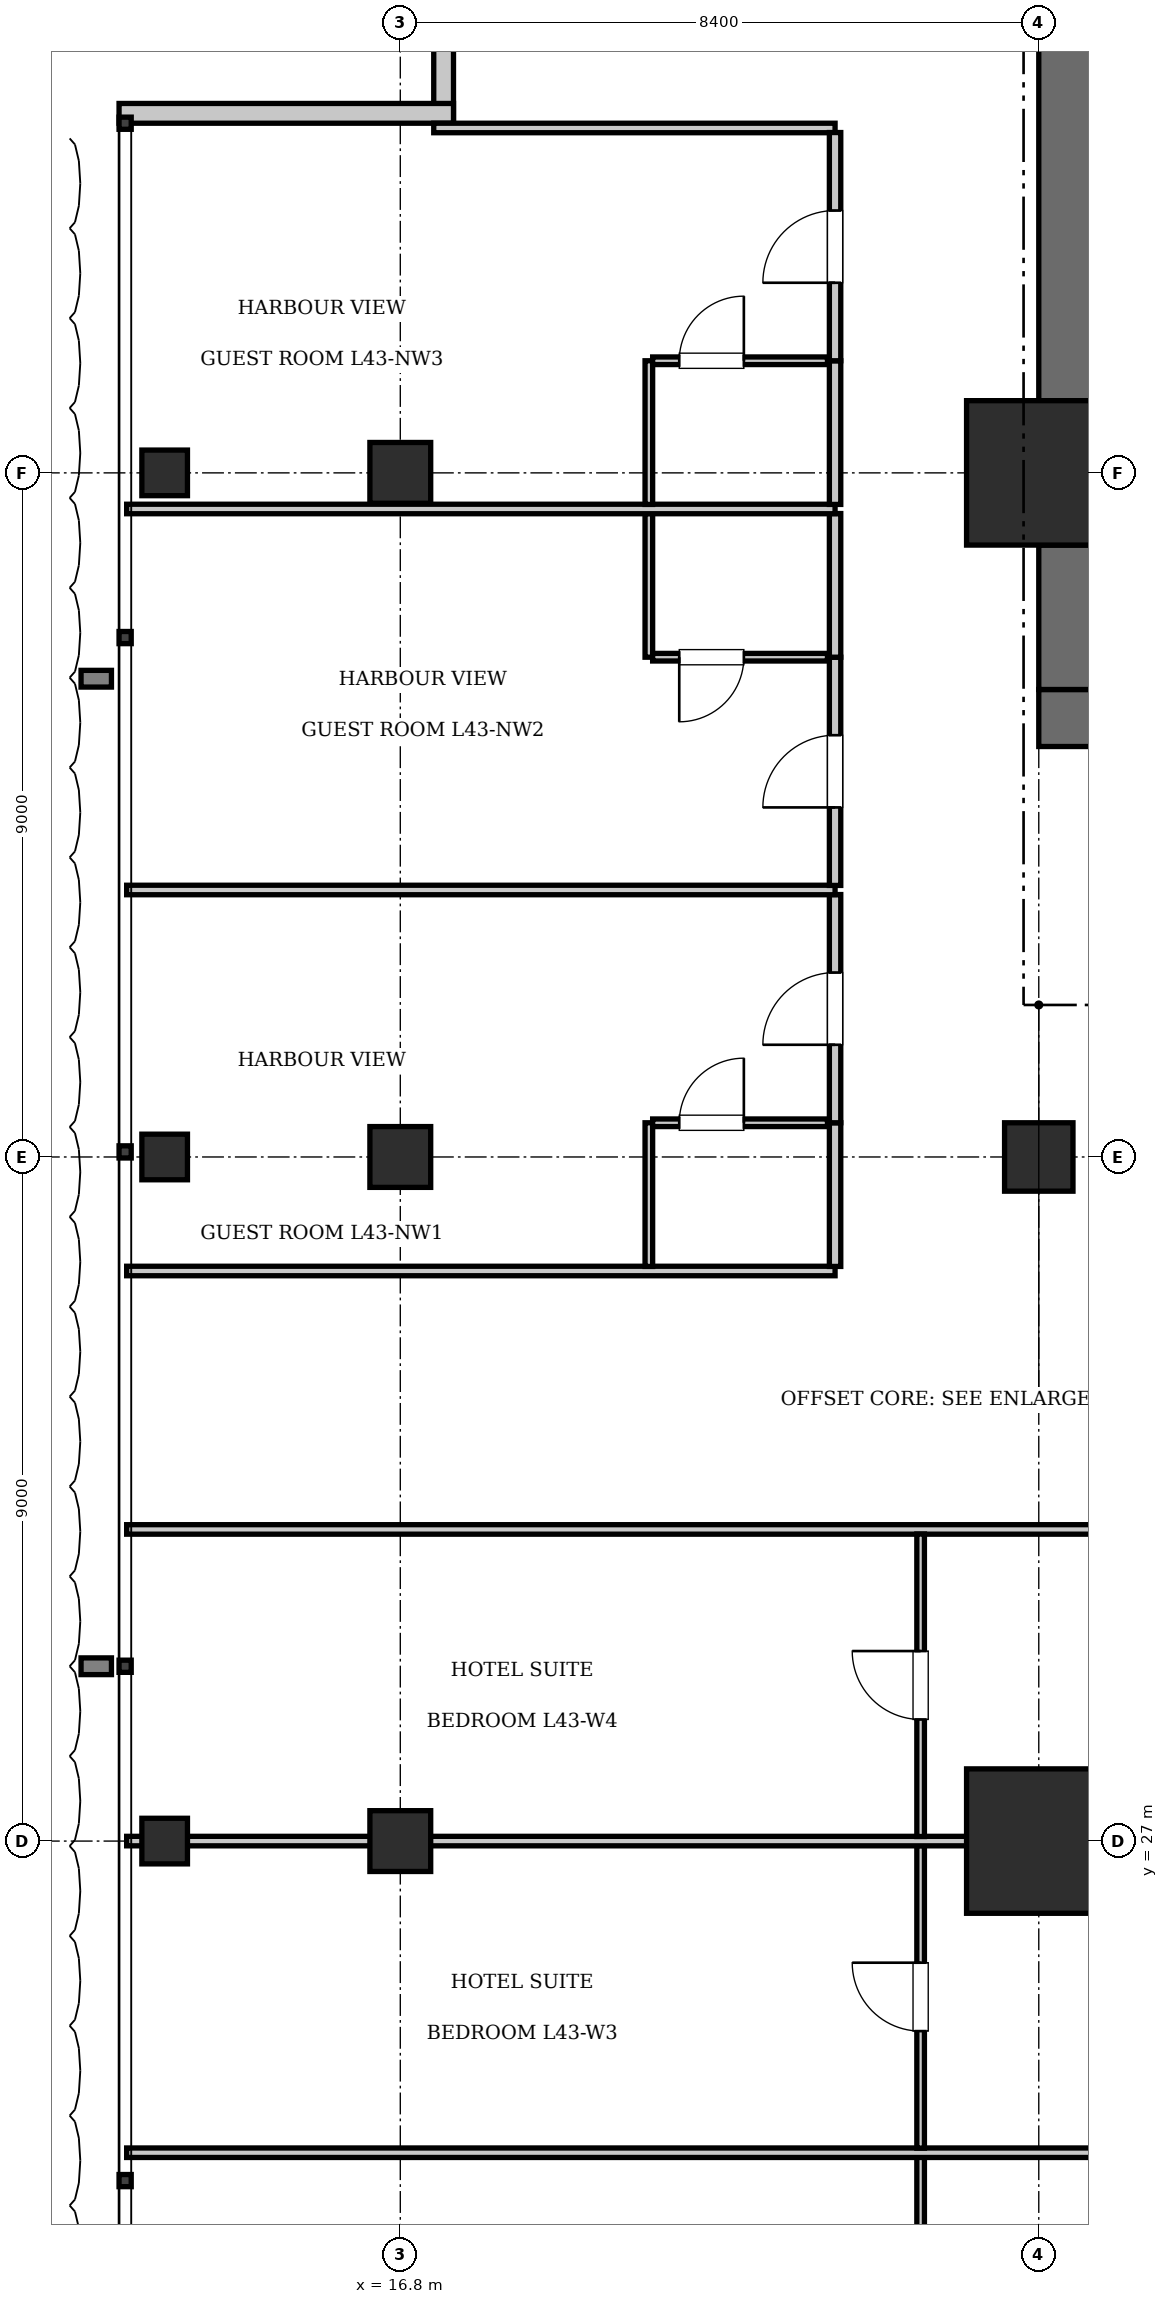
"""IFC4 building model, lengths in metres.
Left out: names, types, materials, properties, quantities, classifications, styles, units other than length and angle.
Written with IfcOpenShell. Run it as: python <this file> out.ifc"""

import sys

from ifc_helpers import new_model, si_unit, direction, frame, frame_2d, origin, origin_2d, place, context, subcontext, project, spatial, rectangle, i_section, extrude, element, fill, save


model = new_model("IFC4")
c1 = context("Model", 3, precision=1e-05, world=origin(), true_north=direction((0.0, 1.0)))
c2 = subcontext(c1, "Body", "Model", "MODEL_VIEW")
j1 = project(units=[si_unit("LENGTHUNIT", "METRE"), si_unit("PLANEANGLEUNIT", "RADIAN")], contexts=[c1])
p1 = place(None, origin())
s1 = spatial("IfcSite", under=j1, at=p1, CompositionType="ELEMENT")
p2 = place(p1, origin())
s2 = spatial("IfcBuilding", under=s1, at=p2, CompositionType="ELEMENT")
p3 = place(p2, frame((0.0, 0.0, 177.45)))
s3 = spatial("IfcBuildingStorey", under=s2, at=p3, CompositionType="ELEMENT", Elevation=177.45)
for number, where, z_axis, x_axis in (
    (1, (25.2, 27.0, 0.0), (0.0, 0.0, 1.0), (1.0, 0.0, 0.0)),
    (2, (25.2, 45.0, 0.0), (0.0, 0.0, 1.0), (1.0, 0.0, 0.0)),
):
    element("IfcColumn", number, at=place(p3, frame(where, z_axis=z_axis, x_axis=x_axis)), inside=s3, PredefinedType="COLUMN", context=c2, shape_type="SweptSolid", body=[
        extrude(rectangle(XDim=1.9, YDim=1.9, at=origin_2d()), origin(), (0.0, 0.0, 1.0), 3.85),
    ])
p4 = place(p3, frame((25.2, 41.775, 0.0), z_axis=(0.0, 0.0, 1.0), x_axis=(1.0, 0.0, 0.0)))
e3 = element("IfcWall", 3, at=p4, inside=s3, PredefinedType="SHEAR", context=c2, shape_type="SweptSolid", body=[
    extrude(rectangle(XDim=6.8, YDim=0.75, at=frame_2d((3.4, 0.0))), origin(), (0.0, 0.0, 1.0), 3.85),
])
p5 = place(p4, frame((1.65, 0.0, 0.0)))
e4 = element("IfcOpeningElement", 4, at=p5, cuts=e3, PredefinedType="OPENING", context=c2, shape_type="SweptSolid", body=[
    extrude(rectangle(XDim=1.15, YDim=2.15, at=frame_2d((0.575, 1.075))), frame((0.0, 0.385, 0.0), z_axis=(0.0, -1.0, 0.0), x_axis=(1.0, 0.0, 0.0)), (0.0, 0.0, 1.0), 0.77),
])
p6 = place(p4, frame((5.15, 0.0, 0.0)))
e5 = element("IfcOpeningElement", 5, at=p6, cuts=e3, PredefinedType="OPENING", context=c2, shape_type="SweptSolid", body=[
    extrude(rectangle(XDim=1.1, YDim=2.2, at=frame_2d((0.55, 1.1))), frame((0.0, 0.385, 0.0), z_axis=(0.0, -1.0, 0.0), x_axis=(1.0, 0.0, 0.0)), (0.0, 0.0, 1.0), 0.77),
])
p7 = place(p3, frame((25.575, 42.15, 0.0), z_axis=(0.0, 0.0, 1.0), x_axis=(0.0, 1.0, 0.0)))
e6 = element("IfcWall", 6, at=p7, inside=s3, PredefinedType="SHEAR", context=c2, shape_type="SweptSolid", body=[
    extrude(rectangle(XDim=1.9, YDim=0.75, at=frame_2d((0.95, 0.0))), origin(), (0.0, 0.0, 1.0), 3.85),
])
p8 = place(p3, frame((25.575, 45.95, 0.0), z_axis=(0.0, 0.0, 1.0), x_axis=(0.0, 1.0, 0.0)))
e7 = element("IfcWall", 7, at=p8, inside=s3, PredefinedType="SHEAR", context=c2, shape_type="SweptSolid", body=[
    extrude(rectangle(XDim=7.3, YDim=0.75, at=frame_2d((3.65, 0.0))), origin(), (0.0, 0.0, 1.0), 3.85),
])
p9 = place(p3, frame((25.2, 36.0, 0.0), z_axis=(0.0, 0.0, 1.0), x_axis=(1.0, 0.0, 0.0)))
e8 = element("IfcColumn", 8, at=p9, inside=s3, PredefinedType="COLUMN", context=c2, shape_type="SweptSolid", body=[
    extrude(rectangle(XDim=0.9, YDim=0.9, at=origin_2d()), origin(), (0.0, 0.0, 1.0), 3.85),
])
for number, where, z_axis, x_axis in (
    (9, (16.8, 27.0, 0.0), (0.0, 0.0, 1.0), (1.0, 0.0, 0.0)),
    (10, (16.8, 36.0, 0.0), (0.0, 0.0, 1.0), (1.0, 0.0, 0.0)),
    (11, (16.8, 45.0, 0.0), (0.0, 0.0, 1.0), (1.0, 0.0, 0.0)),
):
    element("IfcColumn", number, at=place(p3, frame(where, z_axis=z_axis, x_axis=x_axis)), inside=s3, PredefinedType="COLUMN", context=c2, shape_type="SweptSolid", body=[
        extrude(rectangle(XDim=0.8, YDim=0.8, at=origin_2d()), origin(), (0.0, 0.0, 1.0), 3.85),
    ])
for number, where, z_axis, x_axis in (
    (12, (13.7, 27.0, 0.0), (0.0, 0.0, 1.0), (1.0, 0.0, 0.0)),
    (13, (13.7, 36.0, 0.0), (0.0, 0.0, 1.0), (1.0, 0.0, 0.0)),
    (14, (13.7, 45.0, 0.0), (0.0, 0.0, 1.0), (1.0, 0.0, 0.0)),
):
    element("IfcColumn", number, at=place(p3, frame(where, z_axis=z_axis, x_axis=x_axis)), inside=s3, PredefinedType="COLUMN", context=c2, shape_type="SweptSolid", body=[
        extrude(i_section(OverallWidth=0.6, OverallDepth=0.6, WebThickness=0.025, FlangeThickness=0.038, at=origin_2d()), origin(), (0.0, 0.0, 1.0), 3.85),
    ])
for number, where, z_axis, x_axis in (
    (15, (17.37, 49.6, 0.0), (0.0, 0.0, 1.0), (0.0, 1.0, 0.0)),
    (16, (13.1, 49.73, 0.0), (0.0, 0.0, 1.0), (1.0, 0.0, 0.0)),
):
    element("IfcWall", number, at=place(p3, frame(where, z_axis=z_axis, x_axis=x_axis)), inside=s3, PredefinedType="SOLIDWALL", context=c2, shape_type="SweptSolid", body=[
        extrude(rectangle(XDim=4.4, YDim=0.26, at=frame_2d((2.2, 0.0))), origin(), (0.0, 0.0, 1.0), 3.61),
    ])
p10 = place(p3, frame((13.2, 31.1, 0.0), z_axis=(0.0, 0.0, 1.0), x_axis=(1.0, 0.0, 0.0)))
e17 = element("IfcWall", 17, at=p10, inside=s3, PredefinedType="PARTITIONING", context=c2, shape_type="SweptSolid", body=[
    extrude(rectangle(XDim=24.32, YDim=0.125, at=frame_2d((12.16, 0.0))), origin(), (0.0, 0.0, 1.0), 3.61),
])
p11 = place(p3, frame((23.646, 18.86, 0.0), z_axis=(0.0, 0.0, 1.0), x_axis=(0.0, 1.0, 0.0)))
e18 = element("IfcWall", 18, at=p11, inside=s3, PredefinedType="PARTITIONING", context=c2, shape_type="SweptSolid", body=[
    extrude(rectangle(XDim=3.98, YDim=0.1, at=frame_2d((1.99, 0.0))), origin(), (0.0, 0.0, 1.0), 3.61),
])
p12 = place(p11, frame((1.54, 0.0, 0.0)))
e19 = element("IfcOpeningElement", 19, at=p12, cuts=e18, PredefinedType="OPENING", context=c2, shape_type="SweptSolid", body=[
    extrude(rectangle(XDim=0.9, YDim=2.1, at=frame_2d((0.45, 1.05))), frame((0.0, 0.06, 0.0), z_axis=(0.0, -1.0, 0.0), x_axis=(1.0, 0.0, 0.0)), (0.0, 0.0, 1.0), 0.12),
])
p13 = place(p3, frame((13.2, 22.9, 0.0), z_axis=(0.0, 0.0, 1.0), x_axis=(1.0, 0.0, 0.0)))
e20 = element("IfcWall", 20, at=p13, inside=s3, PredefinedType="PARTITIONING", context=c2, shape_type="SweptSolid", body=[
    extrude(rectangle(XDim=24.32, YDim=0.125, at=frame_2d((12.16, 0.0))), origin(), (0.0, 0.0, 1.0), 3.61),
])
p14 = place(p3, frame((23.646, 22.96, 0.0), z_axis=(0.0, 0.0, 1.0), x_axis=(0.0, 1.0, 0.0)))
e21 = element("IfcWall", 21, at=p14, inside=s3, PredefinedType="PARTITIONING", context=c2, shape_type="SweptSolid", body=[
    extrude(rectangle(XDim=3.98, YDim=0.1, at=frame_2d((1.99, 0.0))), origin(), (0.0, 0.0, 1.0), 3.61),
])
p15 = place(p14, frame((1.54, 0.0, 0.0)))
e22 = element("IfcOpeningElement", 22, at=p15, cuts=e21, PredefinedType="OPENING", context=c2, shape_type="SweptSolid", body=[
    extrude(rectangle(XDim=0.9, YDim=2.1, at=frame_2d((0.45, 1.05))), frame((0.0, 0.06, 0.0), z_axis=(0.0, -1.0, 0.0), x_axis=(1.0, 0.0, 0.0)), (0.0, 0.0, 1.0), 0.12),
])
p16 = place(p3, frame((13.2, 27.0, 0.0), z_axis=(0.0, 0.0, 1.0), x_axis=(1.0, 0.0, 0.0)))
e23 = element("IfcWall", 23, at=p16, inside=s3, PredefinedType="PARTITIONING", context=c2, shape_type="SweptSolid", body=[
    extrude(rectangle(XDim=24.32, YDim=0.125, at=frame_2d((12.16, 0.0))), origin(), (0.0, 0.0, 1.0), 2.41),
])
p17 = place(p3, frame((23.646, 27.06, 0.0), z_axis=(0.0, 0.0, 1.0), x_axis=(0.0, 1.0, 0.0)))
e24 = element("IfcWall", 24, at=p17, inside=s3, PredefinedType="PARTITIONING", context=c2, shape_type="SweptSolid", body=[
    extrude(rectangle(XDim=3.98, YDim=0.1, at=frame_2d((1.99, 0.0))), origin(), (0.0, 0.0, 1.0), 3.61),
])
p18 = place(p17, frame((1.54, 0.0, 0.0)))
e25 = element("IfcOpeningElement", 25, at=p18, cuts=e24, PredefinedType="OPENING", context=c2, shape_type="SweptSolid", body=[
    extrude(rectangle(XDim=0.9, YDim=2.1, at=frame_2d((0.45, 1.05))), frame((0.0, 0.06, 0.0), z_axis=(0.0, -1.0, 0.0), x_axis=(1.0, 0.0, 0.0)), (0.0, 0.0, 1.0), 0.12),
])
p19 = place(p3, frame((13.2, 34.5, 0.0), z_axis=(0.0, 0.0, 1.0), x_axis=(1.0, 0.0, 0.0)))
e26 = element("IfcWall", 26, at=p19, inside=s3, PredefinedType="PARTITIONING", context=c2, shape_type="SweptSolid", body=[
    extrude(rectangle(XDim=9.32, YDim=0.125, at=frame_2d((4.66, 0.0))), origin(), (0.0, 0.0, 1.0), 3.61),
])
p20 = place(p3, frame((17.24, 49.538, 0.0), z_axis=(0.0, 0.0, 1.0), x_axis=(1.0, 0.0, 0.0)))
e27 = element("IfcWall", 27, at=p20, inside=s3, PredefinedType="PARTITIONING", context=c2, shape_type="SweptSolid", body=[
    extrude(rectangle(XDim=5.28, YDim=0.125, at=frame_2d((2.64, 0.0))), origin(), (0.0, 0.0, 1.0), 3.61),
])
p21 = place(p3, frame((22.52, 34.56, 0.0), z_axis=(0.0, 0.0, 1.0), x_axis=(0.0, 1.0, 0.0)))
e28 = element("IfcWall", 28, at=p21, inside=s3, PredefinedType="PARTITIONING", context=c2, shape_type="SweptSolid", body=[
    extrude(rectangle(XDim=1.89, YDim=0.15, at=frame_2d((0.945, 0.0))), origin(), (0.0, 0.0, 1.0), 3.61),
])
p22 = place(p3, frame((22.52, 36.45, 0.0), z_axis=(0.0, 0.0, 1.0), x_axis=(0.0, 1.0, 0.0)))
e29 = element("IfcWall", 29, at=p22, inside=s3, PredefinedType="PARTITIONING", context=c2, shape_type="SweptSolid", body=[
    extrude(rectangle(XDim=3.002, YDim=0.15, at=frame_2d((1.501, 0.0))), origin(), (0.0, 0.0, 1.0), 3.61),
])
p23 = place(p22, frame((1.026, 0.0, 0.0)))
e30 = element("IfcOpeningElement", 30, at=p23, cuts=e29, PredefinedType="OPENING", context=c2, shape_type="SweptSolid", body=[
    extrude(rectangle(XDim=0.95, YDim=2.15, at=frame_2d((0.475, 1.075))), frame((0.0, 0.085, 0.0), z_axis=(0.0, -1.0, 0.0), x_axis=(1.0, 0.0, 0.0)), (0.0, 0.0, 1.0), 0.17),
])
p24 = place(p3, frame((20.07, 34.56, 0.0), z_axis=(0.0, 0.0, 1.0), x_axis=(0.0, 1.0, 0.0)))
e31 = element("IfcWall", 31, at=p24, inside=s3, PredefinedType="PARTITIONING", context=c2, shape_type="SweptSolid", body=[
    extrude(rectangle(XDim=1.89, YDim=0.1, at=frame_2d((0.945, 0.0))), origin(), (0.0, 0.0, 1.0), 3.61),
])
p25 = place(p3, frame((20.12, 36.45, 0.0), z_axis=(0.0, 0.0, 1.0), x_axis=(1.0, 0.0, 0.0)))
e32 = element("IfcWall", 32, at=p25, inside=s3, PredefinedType="PARTITIONING", context=c2, shape_type="SweptSolid", body=[
    extrude(rectangle(XDim=2.3, YDim=0.1, at=frame_2d((1.15, 0.0))), origin(), (0.0, 0.0, 1.0), 3.61),
])
p26 = place(p25, frame((0.35, 0.0, 0.0)))
e33 = element("IfcOpeningElement", 33, at=p26, cuts=e32, PredefinedType="OPENING", context=c2, shape_type="SweptSolid", body=[
    extrude(rectangle(XDim=0.85, YDim=2.1, at=frame_2d((0.425, 1.05))), frame((0.0, 0.06, 0.0), z_axis=(0.0, -1.0, 0.0), x_axis=(1.0, 0.0, 0.0)), (0.0, 0.0, 1.0), 0.12),
])
p27 = place(p3, frame((13.2, 39.512, 0.0), z_axis=(0.0, 0.0, 1.0), x_axis=(1.0, 0.0, 0.0)))
e34 = element("IfcWall", 34, at=p27, inside=s3, PredefinedType="PARTITIONING", context=c2, shape_type="SweptSolid", body=[
    extrude(rectangle(XDim=9.32, YDim=0.125, at=frame_2d((4.66, 0.0))), origin(), (0.0, 0.0, 1.0), 3.61),
])
p28 = place(p3, frame((22.52, 39.573, 0.0), z_axis=(0.0, 0.0, 1.0), x_axis=(0.0, 1.0, 0.0)))
e35 = element("IfcWall", 35, at=p28, inside=s3, PredefinedType="PARTITIONING", context=c2, shape_type="SweptSolid", body=[
    extrude(rectangle(XDim=3.002, YDim=0.15, at=frame_2d((1.501, 0.0))), origin(), (0.0, 0.0, 1.0), 3.61),
])
p29 = place(p28, frame((1.026, 0.0, 0.0)))
e36 = element("IfcOpeningElement", 36, at=p29, cuts=e35, PredefinedType="OPENING", context=c2, shape_type="SweptSolid", body=[
    extrude(rectangle(XDim=0.95, YDim=2.15, at=frame_2d((0.475, 1.075))), frame((0.0, 0.085, 0.0), z_axis=(0.0, -1.0, 0.0), x_axis=(1.0, 0.0, 0.0)), (0.0, 0.0, 1.0), 0.17),
])
p30 = place(p3, frame((22.52, 42.575, 0.0), z_axis=(0.0, 0.0, 1.0), x_axis=(0.0, 1.0, 0.0)))
e37 = element("IfcWall", 37, at=p30, inside=s3, PredefinedType="PARTITIONING", context=c2, shape_type="SweptSolid", body=[
    extrude(rectangle(XDim=1.89, YDim=0.15, at=frame_2d((0.945, 0.0))), origin(), (0.0, 0.0, 1.0), 3.61),
])
p31 = place(p3, frame((20.07, 42.575, 0.0), z_axis=(0.0, 0.0, 1.0), x_axis=(0.0, 1.0, 0.0)))
e38 = element("IfcWall", 38, at=p31, inside=s3, PredefinedType="PARTITIONING", context=c2, shape_type="SweptSolid", body=[
    extrude(rectangle(XDim=1.89, YDim=0.1, at=frame_2d((0.945, 0.0))), origin(), (0.0, 0.0, 1.0), 3.61),
])
p32 = place(p3, frame((20.12, 42.575, 0.0), z_axis=(0.0, 0.0, 1.0), x_axis=(1.0, 0.0, 0.0)))
e39 = element("IfcWall", 39, at=p32, inside=s3, PredefinedType="PARTITIONING", context=c2, shape_type="SweptSolid", body=[
    extrude(rectangle(XDim=2.3, YDim=0.1, at=frame_2d((1.15, 0.0))), origin(), (0.0, 0.0, 1.0), 3.61),
])
p33 = place(p32, frame((0.35, 0.0, 0.0)))
e40 = element("IfcOpeningElement", 40, at=p33, cuts=e39, PredefinedType="OPENING", context=c2, shape_type="SweptSolid", body=[
    extrude(rectangle(XDim=0.85, YDim=2.1, at=frame_2d((0.425, 1.05))), frame((0.0, 0.06, 0.0), z_axis=(0.0, -1.0, 0.0), x_axis=(1.0, 0.0, 0.0)), (0.0, 0.0, 1.0), 0.12),
])
p34 = place(p3, frame((13.2, 44.525, 0.0), z_axis=(0.0, 0.0, 1.0), x_axis=(1.0, 0.0, 0.0)))
e41 = element("IfcWall", 41, at=p34, inside=s3, PredefinedType="PARTITIONING", context=c2, shape_type="SweptSolid", body=[
    extrude(rectangle(XDim=9.32, YDim=0.125, at=frame_2d((4.66, 0.0))), origin(), (0.0, 0.0, 1.0), 3.61),
])
p35 = place(p3, frame((22.52, 44.585, 0.0), z_axis=(0.0, 0.0, 1.0), x_axis=(0.0, 1.0, 0.0)))
e42 = element("IfcWall", 42, at=p35, inside=s3, PredefinedType="PARTITIONING", context=c2, shape_type="SweptSolid", body=[
    extrude(rectangle(XDim=1.89, YDim=0.15, at=frame_2d((0.945, 0.0))), origin(), (0.0, 0.0, 1.0), 3.61),
])
p36 = place(p3, frame((22.52, 46.475, 0.0), z_axis=(0.0, 0.0, 1.0), x_axis=(0.0, 1.0, 0.0)))
e43 = element("IfcWall", 43, at=p36, inside=s3, PredefinedType="PARTITIONING", context=c2, shape_type="SweptSolid", body=[
    extrude(rectangle(XDim=3.002, YDim=0.15, at=frame_2d((1.501, 0.0))), origin(), (0.0, 0.0, 1.0), 3.61),
])
p37 = place(p36, frame((1.026, 0.0, 0.0)))
e44 = element("IfcOpeningElement", 44, at=p37, cuts=e43, PredefinedType="OPENING", context=c2, shape_type="SweptSolid", body=[
    extrude(rectangle(XDim=0.95, YDim=2.15, at=frame_2d((0.475, 1.075))), frame((0.0, 0.085, 0.0), z_axis=(0.0, -1.0, 0.0), x_axis=(1.0, 0.0, 0.0)), (0.0, 0.0, 1.0), 0.17),
])
p38 = place(p3, frame((20.07, 44.585, 0.0), z_axis=(0.0, 0.0, 1.0), x_axis=(0.0, 1.0, 0.0)))
e45 = element("IfcWall", 45, at=p38, inside=s3, PredefinedType="PARTITIONING", context=c2, shape_type="SweptSolid", body=[
    extrude(rectangle(XDim=1.89, YDim=0.1, at=frame_2d((0.945, 0.0))), origin(), (0.0, 0.0, 1.0), 3.61),
])
p39 = place(p3, frame((20.12, 46.475, 0.0), z_axis=(0.0, 0.0, 1.0), x_axis=(1.0, 0.0, 0.0)))
e46 = element("IfcWall", 46, at=p39, inside=s3, PredefinedType="PARTITIONING", context=c2, shape_type="SweptSolid", body=[
    extrude(rectangle(XDim=2.3, YDim=0.1, at=frame_2d((1.15, 0.0))), origin(), (0.0, 0.0, 1.0), 3.61),
])
p40 = place(p39, frame((0.35, 0.0, 0.0)))
e47 = element("IfcOpeningElement", 47, at=p40, cuts=e46, PredefinedType="OPENING", context=c2, shape_type="SweptSolid", body=[
    extrude(rectangle(XDim=0.85, YDim=2.1, at=frame_2d((0.425, 1.05))), frame((0.0, 0.06, 0.0), z_axis=(0.0, -1.0, 0.0), x_axis=(1.0, 0.0, 0.0)), (0.0, 0.0, 1.0), 0.12),
])
p41 = place(p15, origin())
e48 = element("IfcDoor", 48, at=p41, inside=s3, OperationType="SINGLE_SWING_RIGHT", PredefinedType="DOOR", context=c2, shape_type="SweptSolid", body=[
    extrude(rectangle(XDim=0.9, YDim=2.1, at=frame_2d((0.45, 1.05))), frame((0.0, 0.025, 0.0), z_axis=(0.0, -1.0, 0.0), x_axis=(1.0, 0.0, 0.0)), (0.0, 0.0, 1.0), 0.05),
])
fill(e22, e48)
p42 = place(p18, origin())
e49 = element("IfcDoor", 49, at=p42, inside=s3, OperationType="SINGLE_SWING_RIGHT", PredefinedType="DOOR", context=c2, shape_type="SweptSolid", body=[
    extrude(rectangle(XDim=0.9, YDim=2.1, at=frame_2d((0.45, 1.05))), frame((0.0, 0.025, 0.0), z_axis=(0.0, -1.0, 0.0), x_axis=(1.0, 0.0, 0.0)), (0.0, 0.0, 1.0), 0.05),
])
fill(e25, e49)
p43 = place(p26, origin())
e50 = element("IfcDoor", 50, at=p43, inside=s3, OperationType="SINGLE_SWING_RIGHT", PredefinedType="DOOR", context=c2, shape_type="SweptSolid", body=[
    extrude(rectangle(XDim=0.85, YDim=2.1, at=frame_2d((0.425, 1.05))), frame((0.0, 0.025, 0.0), z_axis=(0.0, -1.0, 0.0), x_axis=(1.0, 0.0, 0.0)), (0.0, 0.0, 1.0), 0.05),
])
fill(e33, e50)
p44 = place(p23, origin())
e51 = element("IfcDoor", 51, at=p44, inside=s3, OperationType="SINGLE_SWING_LEFT", PredefinedType="DOOR", context=c2, shape_type="SweptSolid", body=[
    extrude(rectangle(XDim=0.95, YDim=2.15, at=frame_2d((0.475, 1.075))), frame((0.0, 0.025, 0.0), z_axis=(0.0, -1.0, 0.0), x_axis=(1.0, 0.0, 0.0)), (0.0, 0.0, 1.0), 0.05),
])
fill(e30, e51)
p45 = place(p33, frame((0.85, 0.0, 0.0), z_axis=(0.0, 0.0, 1.0), x_axis=(-1.0, 0.0, 0.0)))
e52 = element("IfcDoor", 52, at=p45, inside=s3, OperationType="SINGLE_SWING_RIGHT", PredefinedType="DOOR", context=c2, shape_type="SweptSolid", body=[
    extrude(rectangle(XDim=0.85, YDim=2.1, at=frame_2d((0.425, 1.05))), frame((0.0, 0.025, 0.0), z_axis=(0.0, -1.0, 0.0), x_axis=(1.0, 0.0, 0.0)), (0.0, 0.0, 1.0), 0.05),
])
fill(e40, e52)
p46 = place(p29, origin())
e53 = element("IfcDoor", 53, at=p46, inside=s3, OperationType="SINGLE_SWING_LEFT", PredefinedType="DOOR", context=c2, shape_type="SweptSolid", body=[
    extrude(rectangle(XDim=0.95, YDim=2.15, at=frame_2d((0.475, 1.075))), frame((0.0, 0.025, 0.0), z_axis=(0.0, -1.0, 0.0), x_axis=(1.0, 0.0, 0.0)), (0.0, 0.0, 1.0), 0.05),
])
fill(e36, e53)
p47 = place(p40, origin())
e54 = element("IfcDoor", 54, at=p47, inside=s3, OperationType="SINGLE_SWING_RIGHT", PredefinedType="DOOR", context=c2, shape_type="SweptSolid", body=[
    extrude(rectangle(XDim=0.85, YDim=2.1, at=frame_2d((0.425, 1.05))), frame((0.0, 0.025, 0.0), z_axis=(0.0, -1.0, 0.0), x_axis=(1.0, 0.0, 0.0)), (0.0, 0.0, 1.0), 0.05),
])
fill(e47, e54)
p48 = place(p37, origin())
e55 = element("IfcDoor", 55, at=p48, inside=s3, OperationType="SINGLE_SWING_LEFT", PredefinedType="DOOR", context=c2, shape_type="SweptSolid", body=[
    extrude(rectangle(XDim=0.95, YDim=2.15, at=frame_2d((0.475, 1.075))), frame((0.0, 0.025, 0.0), z_axis=(0.0, -1.0, 0.0), x_axis=(1.0, 0.0, 0.0)), (0.0, 0.0, 1.0), 0.05),
])
fill(e44, e55)
save(model, sys.argv[1])
